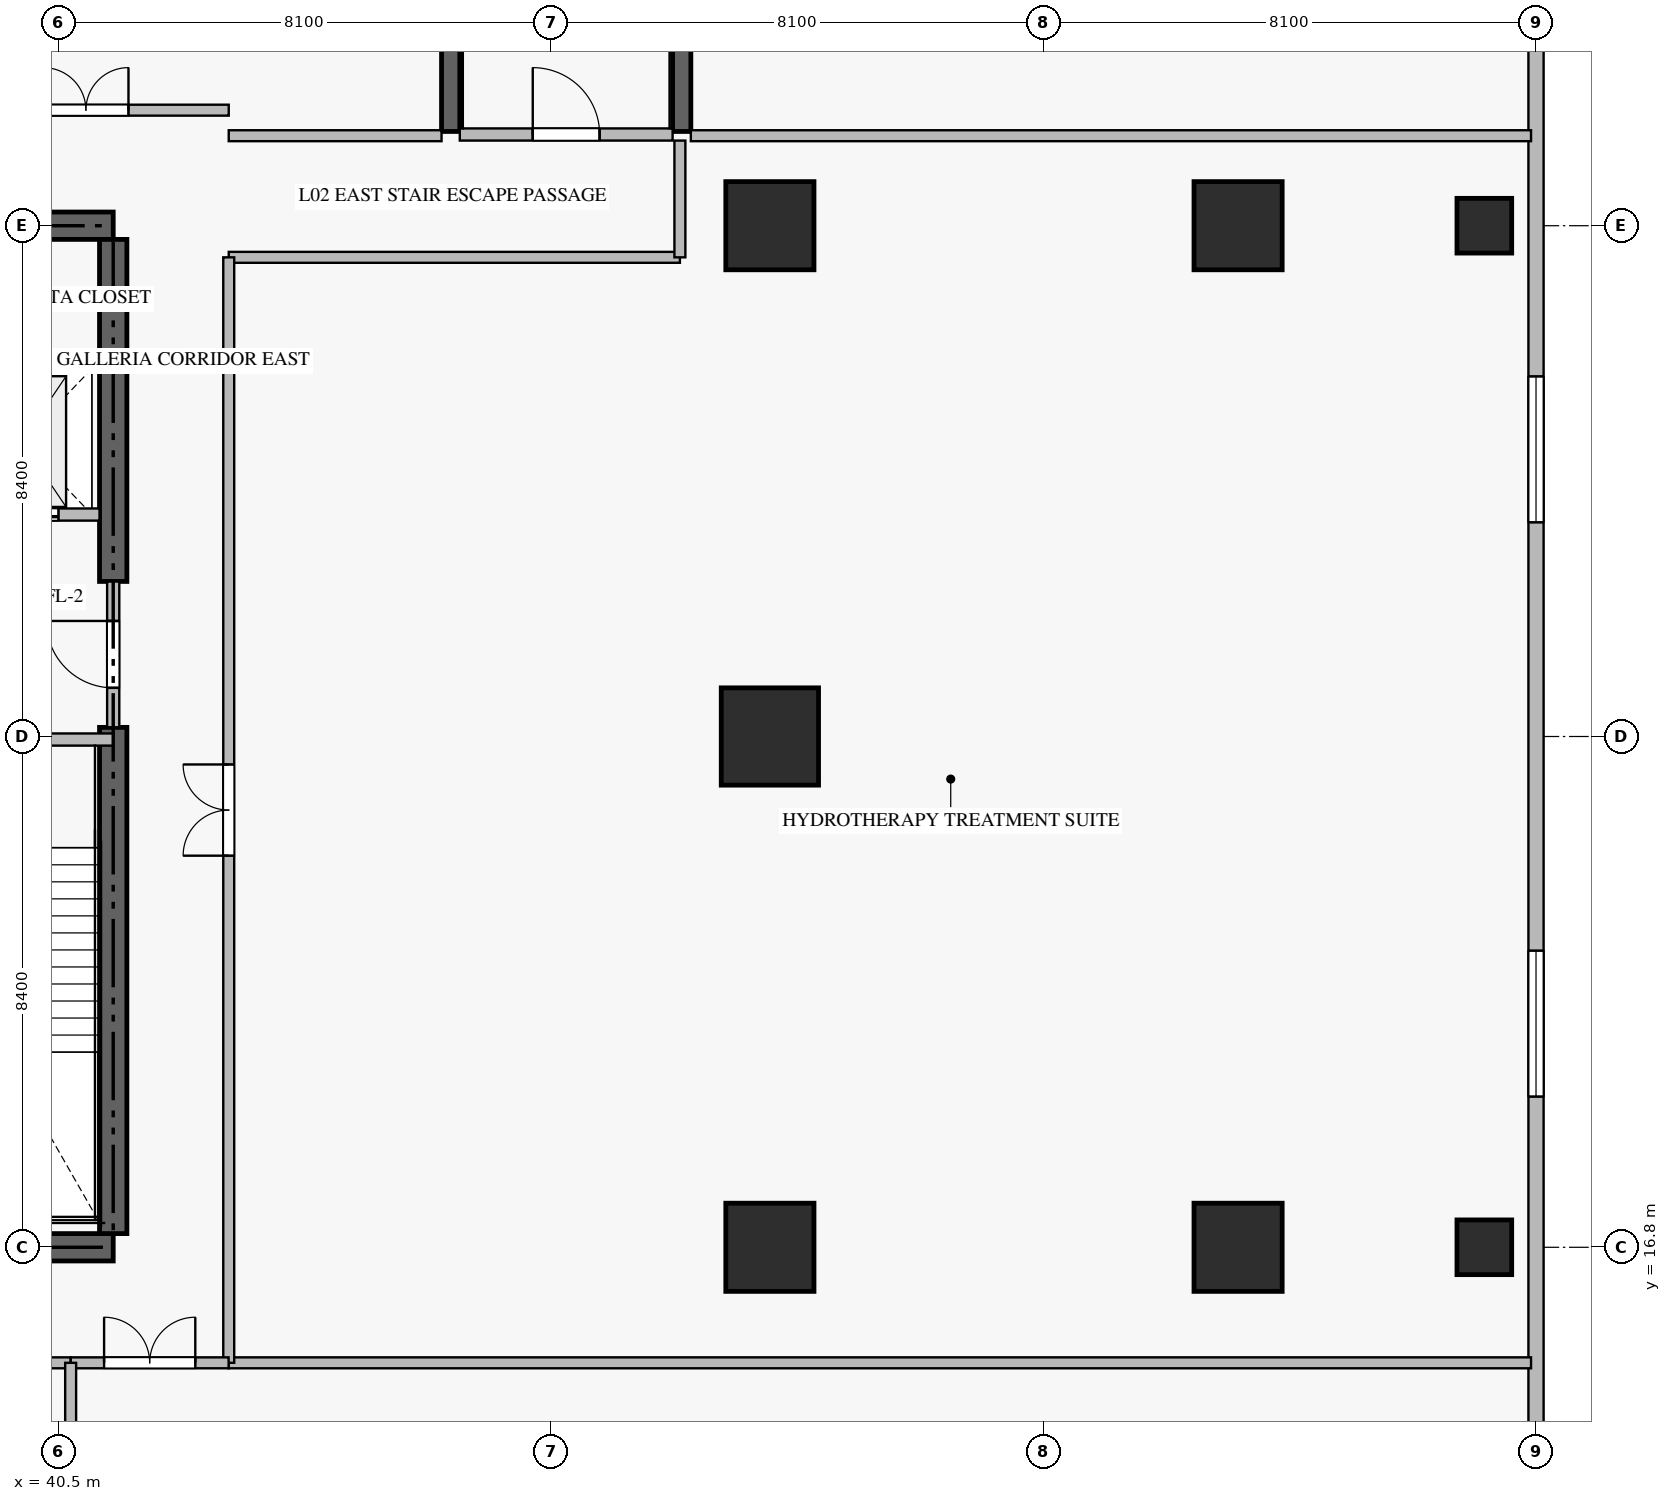
"""IFC4 building model, lengths in metres.
Left out: names, types, materials, properties, quantities, classifications, styles, units other than length and angle.
Written with IfcOpenShell. Run it as: python <this file> out.ifc"""

import sys

from ifc_helpers import new_model, si_unit, direction, frame, frame_2d, origin, origin_2d, place, context, subcontext, project, spatial, rectangle, extrude, source, transform, mapped, element, fill, save


model = new_model("IFC4")
c1 = context("Model", 3, precision=1e-05, world=origin(), true_north=direction((0.0, 1.0)))
c2 = subcontext(c1, "Body", "Model", "MODEL_VIEW")
j1 = project(units=[si_unit("LENGTHUNIT", "METRE"), si_unit("PLANEANGLEUNIT", "RADIAN")], contexts=[c1])
p1 = place(None, origin())
s1 = spatial("IfcSite", under=j1, at=p1, CompositionType="ELEMENT")
p2 = place(p1, origin())
s2 = spatial("IfcBuilding", under=s1, at=p2, CompositionType="ELEMENT")
p3 = place(p2, frame((0.0, 0.0, 10.5)))
s3 = spatial("IfcBuildingStorey", under=s2, at=p3, CompositionType="ELEMENT", Elevation=10.5)
for number, where, z_axis, x_axis in (
    (1, (23.4, 16.8, -0.38), (0.0, 0.0, 1.0), (1.0, 0.0, 0.0)),
    (2, (41.4, 33.6, -0.38), (0.0, 0.0, 1.0), (-1.0, 0.0, 0.0)),
):
    element("IfcWall", number, at=place(p3, frame(where, z_axis=z_axis, x_axis=x_axis)), inside=s3, PredefinedType="SHEAR", context=c2, shape_type="SweptSolid", body=[
        extrude(rectangle(XDim=18.0, YDim=0.45, at=frame_2d((9.0, 0.0))), origin(), (0.0, 0.0, 1.0), 4.798),
    ])
p4 = place(p3, frame((41.4, 17.025, -0.38), z_axis=(0.0, 0.0, 1.0), x_axis=(0.0, 1.0, 0.0)))
e3 = element("IfcWall", 3, at=p4, inside=s3, PredefinedType="SHEAR", context=c2, shape_type="SweptSolid", body=[
    extrude(rectangle(XDim=8.325, YDim=0.45, at=frame_2d((4.163, 0.0))), origin(), (0.0, 0.0, 1.0), 4.798),
])
p5 = place(p3, frame((41.4, 27.75, -0.38), z_axis=(0.0, 0.0, 1.0), x_axis=(0.0, 1.0, 0.0)))
e4 = element("IfcWall", 4, at=p5, inside=s3, PredefinedType="SHEAR", context=c2, shape_type="SweptSolid", body=[
    extrude(rectangle(XDim=5.625, YDim=0.45, at=frame_2d((2.812, 0.0))), origin(), (0.0, 0.0, 1.0), 4.798),
])
m1 = source(origin(), c2, "Body", "SweptSolid", [
    extrude(rectangle(XDim=0.9, YDim=0.9, at=origin_2d()), origin(), (0.0, 0.0, 1.0), 4.8),
])
for number, where, z_axis, x_axis in (
    (5, (63.95, 16.8, -0.38), (0.0, 0.0, 1.0), (1.0, 0.0, 0.0)),
    (6, (63.95, 33.6, -0.38), (0.0, 0.0, 1.0), (1.0, 0.0, 0.0)),
):
    element("IfcColumn", number, at=place(p3, frame(where, z_axis=z_axis, x_axis=x_axis)), inside=s3, PredefinedType="COLUMN", context=c2, shape_type="MappedRepresentation", body=[
        mapped(m1, transform((0.0, 0.0, 0.0), scale=1.0)),
    ])
m2 = source(origin(), c2, "Body", "SweptSolid", [
    extrude(rectangle(XDim=1.45, YDim=1.45, at=origin_2d()), origin(), (0.0, 0.0, 1.0), 4.8),
])
p6 = place(p3, frame((52.2, 16.8, -0.38), z_axis=(0.0, 0.0, 1.0), x_axis=(1.0, 0.0, 0.0)))
e7 = element("IfcColumn", 7, at=p6, inside=s3, PredefinedType="COLUMN", context=c2, shape_type="MappedRepresentation", body=[
    mapped(m2, transform((0.0, 0.0, 0.0), scale=1.0)),
])
m3 = source(origin(), c2, "Body", "SweptSolid", [
    extrude(rectangle(XDim=1.6, YDim=1.6, at=origin_2d()), origin(), (0.0, 0.0, 1.0), 4.8),
])
p7 = place(p3, frame((52.2, 25.2, -0.38), z_axis=(0.0, 0.0, 1.0), x_axis=(1.0, 0.0, 0.0)))
e8 = element("IfcColumn", 8, at=p7, inside=s3, PredefinedType="COLUMN", context=c2, shape_type="MappedRepresentation", body=[
    mapped(m3, transform((0.0, 0.0, 0.0), scale=1.0)),
])
for number, where, z_axis, x_axis in (
    (9, (52.2, 33.6, -0.38), (0.0, 0.0, 1.0), (1.0, 0.0, 0.0)),
    (10, (59.9, 16.8, -0.38), (0.0, 0.0, 1.0), (1.0, 0.0, 0.0)),
    (11, (59.9, 33.6, -0.38), (0.0, 0.0, 1.0), (1.0, 0.0, 0.0)),
):
    element("IfcColumn", number, at=place(p3, frame(where, z_axis=z_axis, x_axis=x_axis)), inside=s3, PredefinedType="COLUMN", context=c2, shape_type="MappedRepresentation", body=[
        mapped(m2, transform((0.0, 0.0, 0.0), scale=1.0)),
    ])
p8 = place(p3, frame((64.8, 4.325, 0.0), z_axis=(0.0, 0.0, 1.0), x_axis=(0.0, 1.0, 0.0)))
e12 = element("IfcWall", 12, at=p8, inside=s3, PredefinedType="ELEMENTEDWALL", context=c2, shape_type="SweptSolid", body=[
    extrude(rectangle(XDim=41.75, YDim=0.25, at=frame_2d((20.875, 0.0))), origin(), (0.0, 0.0, 1.0), 4.405),
])
p9 = place(p8, frame((14.953, 0.0, 0.6)))
e13 = element("IfcOpeningElement", 13, at=p9, cuts=e12, PredefinedType="OPENING", context=c2, shape_type="SweptSolid", body=[
    extrude(rectangle(XDim=2.4, YDim=2.6, at=frame_2d((1.2, 1.3))), frame((0.0, 0.135, 0.0), z_axis=(0.0, -1.0, 0.0), x_axis=(1.0, 0.0, 0.0)), (0.0, 0.0, 1.0), 0.27),
])
p10 = place(p8, frame((24.397, 0.0, 0.6)))
e14 = element("IfcOpeningElement", 14, at=p10, cuts=e12, PredefinedType="OPENING", context=c2, shape_type="SweptSolid", body=[
    extrude(rectangle(XDim=2.4, YDim=2.6, at=frame_2d((1.2, 1.3))), frame((0.0, 0.135, 0.0), z_axis=(0.0, -1.0, 0.0), x_axis=(1.0, 0.0, 0.0)), (0.0, 0.0, 1.0), 0.27),
])
p11 = place(p3, frame((36.95, 25.15, 0.0), z_axis=(0.0, 0.0, 1.0), x_axis=(1.0, 0.0, 0.0)))
e15 = element("IfcWall", 15, at=p11, inside=s3, PredefinedType="STANDARD", context=c2, shape_type="SweptSolid", body=[
    extrude(rectangle(XDim=4.45, YDim=0.2, at=frame_2d((2.225, 0.0))), origin(), (0.0, 0.0, 1.0), 4.42),
])
p12 = place(p11, frame((1.65, 0.0, 0.0)))
e16 = element("IfcOpeningElement", 16, at=p12, cuts=e15, PredefinedType="OPENING", context=c2, shape_type="SweptSolid", body=[
    extrude(rectangle(XDim=1.1, YDim=2.15, at=frame_2d((0.55, 1.075))), frame((0.0, 0.11, 0.0), z_axis=(0.0, -1.0, 0.0), x_axis=(1.0, 0.0, 0.0)), (0.0, 0.0, 1.0), 0.22),
])
for number, where, z_axis, x_axis in (
    (17, (46.95, 35.15, -0.38), (0.0, 0.0, 1.0), (0.0, 1.0, 0.0)),
    (18, (50.75, 35.15, -0.38), (0.0, 0.0, 1.0), (0.0, 1.0, 0.0)),
):
    element("IfcWall", number, at=place(p3, frame(where, z_axis=z_axis, x_axis=x_axis)), inside=s3, PredefinedType="SHEAR", context=c2, shape_type="SweptSolid", body=[
        extrude(rectangle(XDim=7.9, YDim=0.3, at=frame_2d((3.95, 0.0))), origin(), (0.0, 0.0, 1.0), 4.798),
    ])
p13 = place(p3, frame((47.1, 35.1, 0.0), z_axis=(0.0, 0.0, 1.0), x_axis=(1.0, 0.0, 0.0)))
e19 = element("IfcWall", 19, at=p13, inside=s3, PredefinedType="STANDARD", context=c2, shape_type="SweptSolid", body=[
    extrude(rectangle(XDim=3.5, YDim=0.2, at=frame_2d((1.75, 0.0))), origin(), (0.0, 0.0, 1.0), 4.42),
])
p14 = place(p13, frame((1.2, 0.0, 0.0)))
e20 = element("IfcOpeningElement", 20, at=p14, cuts=e19, PredefinedType="OPENING", context=c2, shape_type="SweptSolid", body=[
    extrude(rectangle(XDim=1.1, YDim=2.15, at=frame_2d((0.55, 1.075))), frame((0.0, 0.11, 0.0), z_axis=(0.0, -1.0, 0.0), x_axis=(1.0, 0.0, 0.0)), (0.0, 0.0, 1.0), 0.22),
])
p15 = place(p3, frame((38.75, 28.85, 0.0), z_axis=(0.0, 0.0, 1.0), x_axis=(1.0, 0.0, 0.0)))
e21 = element("IfcWall", 21, at=p15, inside=s3, PredefinedType="STANDARD", context=c2, shape_type="SweptSolid", body=[
    extrude(rectangle(XDim=2.425, YDim=0.2, at=frame_2d((1.212, 0.0))), origin(), (0.0, 0.0, 1.0), 4.42),
])
p16 = place(p15, frame((0.55, 0.0, 0.0)))
e22 = element("IfcOpeningElement", 22, at=p16, cuts=e21, PredefinedType="OPENING", context=c2, shape_type="SweptSolid", body=[
    extrude(rectangle(XDim=1.2, YDim=2.2, at=frame_2d((0.6, 1.1))), frame((0.0, 0.11, 0.0), z_axis=(0.0, -1.0, 0.0), x_axis=(1.0, 0.0, 0.0)), (0.0, 0.0, 1.0), 0.22),
])
p17 = place(p3, frame((38.75, 31.35, 0.0), z_axis=(0.0, 0.0, 1.0), x_axis=(1.0, 0.0, 0.0)))
e23 = element("IfcWall", 23, at=p17, inside=s3, PredefinedType="STANDARD", context=c2, shape_type="SweptSolid", body=[
    extrude(rectangle(XDim=2.425, YDim=0.2, at=frame_2d((1.212, 0.0))), origin(), (0.0, 0.0, 1.0), 4.42),
])
p18 = place(p3, frame((41.4, 25.352, 0.0), z_axis=(0.0, 0.0, 1.0), x_axis=(0.0, 1.0, 0.0)))
e24 = element("IfcWall", 24, at=p18, inside=s3, PredefinedType="STANDARD", context=c2, shape_type="SweptSolid", body=[
    extrude(rectangle(XDim=2.396, YDim=0.2, at=frame_2d((1.198, 0.0))), origin(), (0.0, 0.0, 1.0), 4.42),
])
p19 = place(p18, frame((0.648, 0.0, 0.0)))
e25 = element("IfcOpeningElement", 25, at=p19, cuts=e24, PredefinedType="OPENING", context=c2, shape_type="SweptSolid", body=[
    extrude(rectangle(XDim=1.1, YDim=2.15, at=frame_2d((0.55, 1.075))), frame((0.0, 0.11, 0.0), z_axis=(0.0, -1.0, 0.0), x_axis=(1.0, 0.0, 0.0)), (0.0, 0.0, 1.0), 0.22),
])
p20 = place(p3, frame((43.3, 14.9, 0.0), z_axis=(0.0, 0.0, 1.0), x_axis=(1.0, 0.0, 0.0)))
e26 = element("IfcWall", 26, at=p20, inside=s3, PredefinedType="PARTITIONING", context=c2, shape_type="SweptSolid", body=[
    extrude(rectangle(XDim=21.418, YDim=0.18, at=frame_2d((10.709, 0.0))), origin(), (0.0, 0.0, 1.0), 4.42),
])
p21 = place(p3, frame((43.3, 35.08, 0.0), z_axis=(0.0, 0.0, 1.0), x_axis=(1.0, 0.0, 0.0)))
e27 = element("IfcWall", 27, at=p21, inside=s3, PredefinedType="PARTITIONING", context=c2, shape_type="SweptSolid", body=[
    extrude(rectangle(XDim=3.5, YDim=0.18, at=frame_2d((1.75, 0.0))), origin(), (0.0, 0.0, 1.0), 4.42),
])
p22 = place(p3, frame((43.3, 33.08, 0.0), z_axis=(0.0, 0.0, 1.0), x_axis=(1.0, 0.0, 0.0)))
e28 = element("IfcWall", 28, at=p22, inside=s3, PredefinedType="PARTITIONING", context=c2, shape_type="SweptSolid", body=[
    extrude(rectangle(XDim=7.42, YDim=0.18, at=frame_2d((3.71, 0.0))), origin(), (0.0, 0.0, 1.0), 4.42),
])
p23 = place(p3, frame((50.9, 35.08, 0.0), z_axis=(0.0, 0.0, 1.0), x_axis=(1.0, 0.0, 0.0)))
e29 = element("IfcWall", 29, at=p23, inside=s3, PredefinedType="PARTITIONING", context=c2, shape_type="SweptSolid", body=[
    extrude(rectangle(XDim=13.818, YDim=0.18, at=frame_2d((6.909, 0.0))), origin(), (0.0, 0.0, 1.0), 4.42),
])
p24 = place(p3, frame((50.72, 33.08, 0.0), z_axis=(0.0, 0.0, 1.0), x_axis=(0.0, 1.0, 0.0)))
e30 = element("IfcWall", 30, at=p24, inside=s3, PredefinedType="PARTITIONING", context=c2, shape_type="SweptSolid", body=[
    extrude(rectangle(XDim=1.92, YDim=0.18, at=frame_2d((0.96, 0.0))), origin(), (0.0, 0.0, 1.0), 4.42),
])
p25 = place(p3, frame((43.3, 14.9, 0.0), z_axis=(0.0, 0.0, 1.0), x_axis=(0.0, 1.0, 0.0)))
e31 = element("IfcWall", 31, at=p25, inside=s3, PredefinedType="PARTITIONING", context=c2, shape_type="SweptSolid", body=[
    extrude(rectangle(XDim=18.18, YDim=0.18, at=frame_2d((9.09, 0.0))), origin(), (0.0, 0.0, 1.0), 4.42),
])
p26 = place(p25, frame((8.34, 0.0, 0.0)))
e32 = element("IfcOpeningElement", 32, at=p26, cuts=e31, PredefinedType="OPENING", context=c2, shape_type="SweptSolid", body=[
    extrude(rectangle(XDim=1.5, YDim=2.25, at=frame_2d((0.75, 1.125))), frame((0.0, 0.1, 0.0), z_axis=(0.0, -1.0, 0.0), x_axis=(1.0, 0.0, 0.0)), (0.0, 0.0, 1.0), 0.2),
])
p27 = place(p3, frame((30.802, 14.9, 0.0), z_axis=(0.0, 0.0, 1.0), x_axis=(1.0, 0.0, 0.0)))
e33 = element("IfcWall", 33, at=p27, inside=s3, PredefinedType="PARTITIONING", context=c2, shape_type="SweptSolid", body=[
    extrude(rectangle(XDim=9.898, YDim=0.18, at=frame_2d((4.949, 0.0))), origin(), (0.0, 0.0, 1.0), 4.42),
])
p28 = place(p27, frame((4.149, 0.0, 0.0)))
e34 = element("IfcOpeningElement", 34, at=p28, cuts=e33, PredefinedType="OPENING", context=c2, shape_type="SweptSolid", body=[
    extrude(rectangle(XDim=1.6, YDim=2.3, at=frame_2d((0.8, 1.15))), frame((0.0, 0.1, 0.0), z_axis=(0.0, -1.0, 0.0), x_axis=(1.0, 0.0, 0.0)), (0.0, 0.0, 1.0), 0.2),
])
p29 = place(p3, frame((40.702, 14.9, 0.0), z_axis=(0.0, 0.0, 1.0), x_axis=(1.0, 0.0, 0.0)))
e35 = element("IfcWall", 35, at=p29, inside=s3, PredefinedType="PARTITIONING", context=c2, shape_type="SweptSolid", body=[
    extrude(rectangle(XDim=2.596, YDim=0.18, at=frame_2d((1.298, 0.0))), origin(), (0.0, 0.0, 1.0), 4.42),
])
p30 = place(p29, frame((0.548, 0.0, 0.0)))
e36 = element("IfcOpeningElement", 36, at=p30, cuts=e35, PredefinedType="OPENING", context=c2, shape_type="SweptSolid", body=[
    extrude(rectangle(XDim=1.5, YDim=2.25, at=frame_2d((0.75, 1.125))), frame((0.0, 0.1, 0.0), z_axis=(0.0, -1.0, 0.0), x_axis=(1.0, 0.0, 0.0)), (0.0, 0.0, 1.0), 0.2),
])
p31 = place(p3, frame((38.602, 35.5, 0.0), z_axis=(0.0, 0.0, 1.0), x_axis=(1.0, 0.0, 0.0)))
e37 = element("IfcWall", 37, at=p31, inside=s3, PredefinedType="PARTITIONING", context=c2, shape_type="SweptSolid", body=[
    extrude(rectangle(XDim=4.698, YDim=0.18, at=frame_2d((2.349, 0.0))), origin(), (0.0, 0.0, 1.0), 4.42),
])
p32 = place(p31, frame((1.649, 0.0, 0.0)))
e38 = element("IfcOpeningElement", 38, at=p32, cuts=e37, PredefinedType="OPENING", context=c2, shape_type="SweptSolid", body=[
    extrude(rectangle(XDim=1.4, YDim=2.25, at=frame_2d((0.7, 1.125))), frame((0.0, 0.1, 0.0), z_axis=(0.0, -1.0, 0.0), x_axis=(1.0, 0.0, 0.0)), (0.0, 0.0, 1.0), 0.2),
])
p33 = place(p3, frame((40.7, 4.282, 0.0), z_axis=(0.0, 0.0, 1.0), x_axis=(0.0, 1.0, 0.0)))
e39 = element("IfcWall", 39, at=p33, inside=s3, PredefinedType="PARTITIONING", context=c2, shape_type="SweptSolid", body=[
    extrude(rectangle(XDim=10.618, YDim=0.18, at=frame_2d((5.309, 0.0))), origin(), (0.0, 0.0, 1.0), 4.42),
])
m4 = source(origin(), c2, "Body", "SweptSolid", [
    extrude(rectangle(XDim=2.4, YDim=2.6, at=frame_2d((1.2, 1.3))), frame((0.0, 0.03, 0.0), z_axis=(0.0, -1.0, 0.0), x_axis=(1.0, 0.0, 0.0)), (0.0, 0.0, 1.0), 0.06),
])
p34 = place(p9, origin())
e40 = element("IfcWindow", 40, at=p34, inside=s3, PartitioningType="SINGLE_PANEL", PredefinedType="WINDOW", context=c2, shape_type="MappedRepresentation", body=[
    mapped(m4, transform((0.0, 0.0, 0.0), scale=1.0)),
])
fill(e13, e40)
p35 = place(p10, origin())
e41 = element("IfcWindow", 41, at=p35, inside=s3, PartitioningType="SINGLE_PANEL", PredefinedType="WINDOW", context=c2, shape_type="MappedRepresentation", body=[
    mapped(m4, transform((0.0, 0.0, 0.0), scale=1.0)),
])
fill(e14, e41)
m5 = source(origin(), c2, "Body", "SweptSolid", [
    extrude(rectangle(XDim=1.1, YDim=2.15, at=frame_2d((0.55, 1.075))), frame((0.0, 0.025, 0.0), z_axis=(0.0, -1.0, 0.0), x_axis=(1.0, 0.0, 0.0)), (0.0, 0.0, 1.0), 0.05),
])
p36 = place(p14, origin())
e42 = element("IfcDoor", 42, at=p36, inside=s3, OperationType="SINGLE_SWING_LEFT", PredefinedType="DOOR", context=c2, shape_type="MappedRepresentation", body=[
    mapped(m5, transform((0.0, 0.0, 0.0), scale=1.0)),
])
fill(e20, e42)
m6 = source(origin(), c2, "Body", "SweptSolid", [
    extrude(rectangle(XDim=1.2, YDim=2.2, at=frame_2d((0.6, 1.1))), frame((0.0, 0.025, 0.0), z_axis=(0.0, -1.0, 0.0), x_axis=(1.0, 0.0, 0.0)), (0.0, 0.0, 1.0), 0.05),
])
p37 = place(p16, origin())
e43 = element("IfcDoor", 43, at=p37, inside=s3, OperationType="DOUBLE_DOOR_SLIDING", PredefinedType="DOOR", context=c2, shape_type="MappedRepresentation", body=[
    mapped(m6, transform((0.0, 0.0, 0.0), scale=1.0)),
])
fill(e22, e43)
p38 = place(p19, origin())
e44 = element("IfcDoor", 44, at=p38, inside=s3, OperationType="SINGLE_SWING_RIGHT", PredefinedType="DOOR", context=c2, shape_type="MappedRepresentation", body=[
    mapped(m5, transform((0.0, 0.0, 0.0), scale=1.0)),
])
fill(e25, e44)
m7 = source(origin(), c2, "Body", "SweptSolid", [
    extrude(rectangle(XDim=1.5, YDim=2.25, at=frame_2d((0.75, 1.125))), frame((0.0, 0.025, 0.0), z_axis=(0.0, -1.0, 0.0), x_axis=(1.0, 0.0, 0.0)), (0.0, 0.0, 1.0), 0.05),
])
p39 = place(p26, origin())
e45 = element("IfcDoor", 45, at=p39, inside=s3, OperationType="DOUBLE_DOOR_SINGLE_SWING", PredefinedType="DOOR", context=c2, shape_type="MappedRepresentation", body=[
    mapped(m7, transform((0.0, 0.0, 0.0), scale=1.0)),
])
fill(e32, e45)
p40 = place(p30, origin())
e46 = element("IfcDoor", 46, at=p40, inside=s3, OperationType="DOUBLE_DOOR_SINGLE_SWING", PredefinedType="DOOR", context=c2, shape_type="MappedRepresentation", body=[
    mapped(m7, transform((0.0, 0.0, 0.0), scale=1.0)),
])
fill(e36, e46)
m8 = source(origin(), c2, "Body", "SweptSolid", [
    extrude(rectangle(XDim=1.4, YDim=2.25, at=frame_2d((0.7, 1.125))), frame((0.0, 0.025, 0.0), z_axis=(0.0, -1.0, 0.0), x_axis=(1.0, 0.0, 0.0)), (0.0, 0.0, 1.0), 0.05),
])
p41 = place(p32, origin())
e47 = element("IfcDoor", 47, at=p41, inside=s3, OperationType="DOUBLE_DOOR_SINGLE_SWING", PredefinedType="DOOR", context=c2, shape_type="MappedRepresentation", body=[
    mapped(m8, transform((0.0, 0.0, 0.0), scale=1.0)),
])
fill(e38, e47)
save(model, sys.argv[1])
